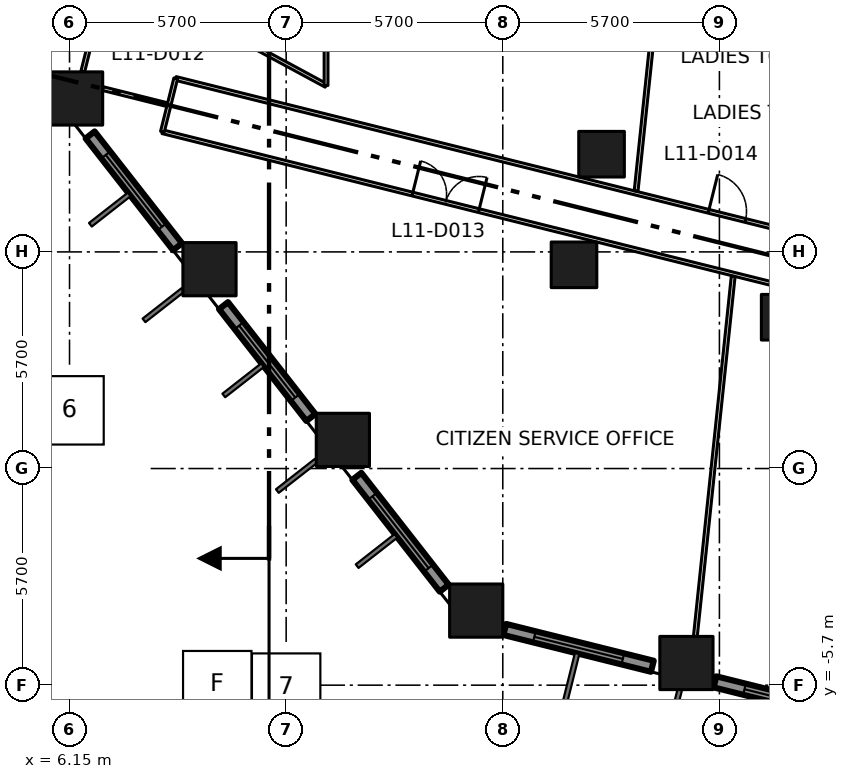
"""IFC4 building model, lengths in metres.
Left out: names, types, materials, properties, quantities, classifications, styles, units other than length and angle.
Written with IfcOpenShell. Run it as: python <this file> out.ifc"""

import sys

from ifc_helpers import new_model, si_unit, direction, frame, frame_2d, origin, origin_2d, place, context, subcontext, project, spatial, rectangle, extrude, element, fill, save


model = new_model("IFC4")
c1 = context("Model", 3, precision=1e-05, world=origin(), true_north=direction((0.0, 1.0)))
c2 = subcontext(c1, "Body", "Model", "MODEL_VIEW")
j1 = project(units=[si_unit("LENGTHUNIT", "METRE"), si_unit("PLANEANGLEUNIT", "RADIAN")], contexts=[c1])
p1 = place(None, origin())
s1 = spatial("IfcSite", under=j1, at=p1, CompositionType="ELEMENT")
p2 = place(p1, origin())
s2 = spatial("IfcBuilding", under=s1, at=p2, CompositionType="ELEMENT")
p3 = place(p2, frame((0.0, 0.0, 54.0)))
s3 = spatial("IfcBuildingStorey", under=s2, at=p3, CompositionType="ELEMENT", Elevation=54.0)
for number, where, z_axis, x_axis in (
    (1, (16.851, -3.738, 0.0), (0.0, 0.0, 1.0), (1.0, 0.0, 0.0)),
    (2, (13.342, 0.754, 0.0), (0.0, 0.0, 1.0), (1.0, 0.0, 0.0)),
    (3, (9.833, 5.245, 0.0), (0.0, 0.0, 1.0), (1.0, 0.0, 0.0)),
    (4, (6.323, 9.737, 0.0), (0.0, 0.0, 1.0), (1.0, 0.0, 0.0)),
    (5, (22.382, -5.117, 0.0), (0.0, 0.0, 1.0), (1.0, 0.0, 0.0)),
):
    element("IfcColumn", number, at=place(p3, frame(where, z_axis=z_axis, x_axis=x_axis)), inside=s3, PredefinedType="COLUMN", context=c2, shape_type="SweptSolid", body=[
        extrude(rectangle(XDim=1.4, YDim=1.4, at=origin_2d()), origin(), (0.0, 0.0, 1.0), 4.2),
    ])
for number, where, z_axis, x_axis in (
    (6, (19.424, 5.36, 0.0), (0.0, 0.0, 1.0), (1.0, 0.0, 0.0)),
    (7, (24.954, 3.981, 0.0), (0.0, 0.0, 1.0), (1.0, 0.0, 0.0)),
    (8, (20.149, 8.271, 0.0), (0.0, 0.0, 1.0), (1.0, 0.0, 0.0)),
):
    element("IfcColumn", number, at=place(p3, frame(where, z_axis=z_axis, x_axis=x_axis)), inside=s3, PredefinedType="COLUMN", context=c2, shape_type="SweptSolid", body=[
        extrude(rectangle(XDim=1.2, YDim=1.2, at=origin_2d()), origin(), (0.0, 0.0, 1.0), 4.2),
    ])
p4 = place(p3, frame((6.692, 8.778, 0.0), z_axis=(0.0, 0.0, 1.0), x_axis=(0.615767067156, -0.787928244833, 0.0)))
e9 = element("IfcWall", 9, at=p4, inside=s3, PredefinedType="SOLIDWALL", context=c2, shape_type="SweptSolid", body=[
    extrude(rectangle(XDim=3.735, YDim=0.3, at=frame_2d((1.868, 0.0))), origin(), (0.0, 0.0, 1.0), 3.1),
])
p5 = place(p4, frame((0.668, 0.0, 0.8)))
e10 = element("IfcOpeningElement", 10, at=p5, cuts=e9, PredefinedType="OPENING", context=c2, shape_type="SweptSolid", body=[
    extrude(rectangle(XDim=2.4, YDim=2.1, at=frame_2d((1.2, 1.05))), frame((0.0, 0.16, 0.0), z_axis=(0.0, -1.0, 0.0), x_axis=(1.0, 0.0, 0.0)), (0.0, 0.0, 1.0), 0.32),
])
p6 = place(p3, frame((10.202, 4.286, 0.0), z_axis=(0.0, 0.0, 1.0), x_axis=(0.615636430057, -0.788030320474, 0.0)))
e11 = element("IfcWall", 11, at=p6, inside=s3, PredefinedType="SOLIDWALL", context=c2, shape_type="SweptSolid", body=[
    extrude(rectangle(XDim=3.734, YDim=0.3, at=frame_2d((1.867, 0.0))), origin(), (0.0, 0.0, 1.0), 3.1),
])
p7 = place(p6, frame((0.667, 0.0, 0.8)))
e12 = element("IfcOpeningElement", 12, at=p7, cuts=e11, PredefinedType="OPENING", context=c2, shape_type="SweptSolid", body=[
    extrude(rectangle(XDim=2.4, YDim=2.1, at=frame_2d((1.2, 1.05))), frame((0.0, 0.16, 0.0), z_axis=(0.0, -1.0, 0.0), x_axis=(1.0, 0.0, 0.0)), (0.0, 0.0, 1.0), 0.32),
])
p8 = place(p3, frame((13.71, -0.205, 0.0), z_axis=(0.0, 0.0, 1.0), x_axis=(0.615798780214, -0.787903460004, 0.0)))
e13 = element("IfcWall", 13, at=p8, inside=s3, PredefinedType="SOLIDWALL", context=c2, shape_type="SweptSolid", body=[
    extrude(rectangle(XDim=3.735, YDim=0.3, at=frame_2d((1.868, 0.0))), origin(), (0.0, 0.0, 1.0), 3.1),
])
p9 = place(p8, frame((0.667, 0.0, 0.8)))
e14 = element("IfcOpeningElement", 14, at=p9, cuts=e13, PredefinedType="OPENING", context=c2, shape_type="SweptSolid", body=[
    extrude(rectangle(XDim=2.4, YDim=2.1, at=frame_2d((1.2, 1.05))), frame((0.0, 0.16, 0.0), z_axis=(0.0, -1.0, 0.0), x_axis=(1.0, 0.0, 0.0)), (0.0, 0.0, 1.0), 0.32),
])
p10 = place(p3, frame((17.602, -4.234, 0.0), z_axis=(0.0, 0.0, 1.0), x_axis=(0.970260773365, -0.242062040951, 0.0)))
e15 = element("IfcWall", 15, at=p10, inside=s3, PredefinedType="SOLIDWALL", context=c2, shape_type="SweptSolid", body=[
    extrude(rectangle(XDim=4.003, YDim=0.3, at=frame_2d((2.001, 0.0))), origin(), (0.0, 0.0, 1.0), 3.1),
])
p11 = place(p10, frame((0.802, 0.0, 0.8)))
e16 = element("IfcOpeningElement", 16, at=p11, cuts=e15, PredefinedType="OPENING", context=c2, shape_type="SweptSolid", body=[
    extrude(rectangle(XDim=2.4, YDim=2.1, at=frame_2d((1.2, 1.05))), frame((0.0, 0.16, 0.0), z_axis=(0.0, -1.0, 0.0), x_axis=(1.0, 0.0, 0.0)), (0.0, 0.0, 1.0), 0.32),
])
p12 = place(p3, frame((23.133, -5.613, 0.0), z_axis=(0.0, 0.0, 1.0), x_axis=(0.970303772127, -0.241889623168, 0.0)))
e17 = element("IfcWall", 17, at=p12, inside=s3, PredefinedType="SOLIDWALL", context=c2, shape_type="SweptSolid", body=[
    extrude(rectangle(XDim=4.002, YDim=0.3, at=frame_2d((2.001, 0.0))), origin(), (0.0, 0.0, 1.0), 3.1),
])
p13 = place(p12, frame((0.801, 0.0, 0.8)))
e18 = element("IfcOpeningElement", 18, at=p13, cuts=e17, PredefinedType="OPENING", context=c2, shape_type="SweptSolid", body=[
    extrude(rectangle(XDim=2.4, YDim=2.1, at=frame_2d((1.2, 1.05))), frame((0.0, 0.16, 0.0), z_axis=(0.0, -1.0, 0.0), x_axis=(1.0, 0.0, 0.0)), (0.0, 0.0, 1.0), 0.32),
])
p14 = place(p3, frame((8.594, 8.862, 0.0), z_axis=(0.0, 0.0, 1.0), x_axis=(0.970292243361, -0.241935864379, 0.0)))
e19 = element("IfcWall", 19, at=p14, inside=s3, PredefinedType="PARTITIONING", context=c2, shape_type="SweptSolid", body=[
    extrude(rectangle(XDim=68.775, YDim=0.1, at=frame_2d((34.388, 0.0))), origin(), (0.0, 0.0, 1.0), 3.9),
])
p15 = place(p14, frame((36.265, 0.0, 0.0)))
e20 = element("IfcOpeningElement", 20, at=p15, cuts=e19, PredefinedType="OPENING", context=c2, shape_type="SweptSolid", body=[
    extrude(rectangle(XDim=1.8, YDim=2.1, at=frame_2d((0.9, 1.05))), frame((0.0, 0.06, 0.0), z_axis=(0.0, -1.0, 0.0), x_axis=(1.0, 0.0, 0.0)), (0.0, 0.0, 1.0), 0.12),
])
p16 = place(p14, frame((48.365, 0.0, 0.0)))
e21 = element("IfcOpeningElement", 21, at=p16, cuts=e19, PredefinedType="OPENING", context=c2, shape_type="SweptSolid", body=[
    extrude(rectangle(XDim=1.8, YDim=2.1, at=frame_2d((0.9, 1.05))), frame((0.0, 0.06, 0.0), z_axis=(0.0, -1.0, 0.0), x_axis=(1.0, 0.0, 0.0)), (0.0, 0.0, 1.0), 0.12),
])
p17 = place(p14, frame((19.565, 0.0, 0.0)))
e22 = element("IfcOpeningElement", 22, at=p17, cuts=e19, PredefinedType="OPENING", context=c2, shape_type="SweptSolid", body=[
    extrude(rectangle(XDim=1.0, YDim=2.1, at=frame_2d((0.5, 1.05))), frame((0.0, 0.06, 0.0), z_axis=(0.0, -1.0, 0.0), x_axis=(1.0, 0.0, 0.0)), (0.0, 0.0, 1.0), 0.12),
])
p18 = place(p14, frame((24.165, 0.0, 0.0)))
e23 = element("IfcOpeningElement", 23, at=p18, cuts=e19, PredefinedType="OPENING", context=c2, shape_type="SweptSolid", body=[
    extrude(rectangle(XDim=1.8, YDim=2.1, at=frame_2d((0.9, 1.05))), frame((0.0, 0.06, 0.0), z_axis=(0.0, -1.0, 0.0), x_axis=(1.0, 0.0, 0.0)), (0.0, 0.0, 1.0), 0.12),
])
p19 = place(p14, frame((6.78, 0.0, 0.0)))
e24 = element("IfcOpeningElement", 24, at=p19, cuts=e19, PredefinedType="OPENING", context=c2, shape_type="SweptSolid", body=[
    extrude(rectangle(XDim=1.8, YDim=2.1, at=frame_2d((0.9, 1.05))), frame((0.0, 0.06, 0.0), z_axis=(0.0, -1.0, 0.0), x_axis=(1.0, 0.0, 0.0)), (0.0, 0.0, 1.0), 0.12),
])
p20 = place(p3, frame((8.944, 10.264, 0.0), z_axis=(0.0, 0.0, 1.0), x_axis=(0.970300504447, -0.241902730595, 0.0)))
e25 = element("IfcWall", 25, at=p20, inside=s3, PredefinedType="PARTITIONING", context=c2, shape_type="SweptSolid", body=[
    extrude(rectangle(XDim=19.879, YDim=0.1, at=frame_2d((9.939, 0.0))), origin(), (0.0, 0.0, 1.0), 3.9),
])
p21 = place(p20, frame((14.45, 0.0, 0.0)))
e26 = element("IfcOpeningElement", 26, at=p21, cuts=e25, PredefinedType="OPENING", context=c2, shape_type="SweptSolid", body=[
    extrude(rectangle(XDim=1.0, YDim=2.1, at=frame_2d((0.5, 1.05))), frame((0.0, 0.06, 0.0), z_axis=(0.0, -1.0, 0.0), x_axis=(1.0, 0.0, 0.0)), (0.0, 0.0, 1.0), 0.12),
])
p22 = place(p3, frame((8.944, 10.264, 0.0), z_axis=(0.0, 0.0, 1.0), x_axis=(-0.242297077633, -0.970202105837, 0.0)))
e27 = element("IfcWall", 27, at=p22, inside=s3, PredefinedType="PARTITIONING", context=c2, shape_type="SweptSolid", body=[
    extrude(rectangle(XDim=1.445, YDim=0.1, at=frame_2d((0.722, 0.0))), origin(), (0.0, 0.0, 1.0), 3.9),
])
p23 = place(p3, frame((9.9, 11.7, 0.0), z_axis=(0.0, 0.0, 1.0), x_axis=(0.87965147249, -0.475618846291, 0.0)))
e28 = element("IfcWall", 28, at=p23, inside=s3, PredefinedType="PARTITIONING", context=c2, shape_type="SweptSolid", body=[
    extrude(rectangle(XDim=3.41, YDim=0.1, at=frame_2d((1.705, 0.0))), origin(), (0.0, 0.0, 1.0), 3.9),
])
p24 = place(p3, frame((12.9, 10.078, 0.0), z_axis=(0.0, 0.0, 1.0), x_axis=(0.0, 1.0, 0.0)))
e29 = element("IfcWall", 29, at=p24, inside=s3, PredefinedType="PARTITIONING", context=c2, shape_type="SweptSolid", body=[
    extrude(rectangle(XDim=4.022, YDim=0.1, at=frame_2d((2.011, 0.0))), origin(), (0.0, 0.0, 1.0), 3.9),
])
p25 = place(p3, frame((6.797, 11.638, 0.0), z_axis=(0.0, 0.0, 1.0), x_axis=(-0.242396400943, -0.970177295555, 0.0)))
e30 = element("IfcWall", 30, at=p25, inside=s3, PredefinedType="PARTITIONING", context=c2, shape_type="SweptSolid", body=[
    extrude(rectangle(XDim=1.238, YDim=0.1, at=frame_2d((0.619, 0.0))), origin(), (0.0, 0.0, 1.0), 3.9),
])
p26 = place(p3, frame((8.72, 9.574, 0.0), z_axis=(0.0, 0.0, 1.0), x_axis=(-0.97016712555, 0.242437102155, 0.0)))
e31 = element("IfcWall", 31, at=p26, inside=s3, PredefinedType="PARTITIONING", context=c2, shape_type="SweptSolid", body=[
    extrude(rectangle(XDim=1.749, YDim=0.1, at=frame_2d((0.875, 0.0))), origin(), (0.0, 0.0, 1.0), 3.9),
])
p27 = place(p3, frame((21.058, 7.302, 0.0), z_axis=(0.0, 0.0, 1.0), x_axis=(0.10457695042, 0.994516797968, 0.0)))
e32 = element("IfcWall", 32, at=p27, inside=s3, PredefinedType="PARTITIONING", context=c2, shape_type="SweptSolid", body=[
    extrude(rectangle(XDim=6.836, YDim=0.1, at=frame_2d((3.418, 0.0))), origin(), (0.0, 0.0, 1.0), 3.9),
])
p28 = place(p3, frame((22.617, -4.417, 0.0), z_axis=(0.0, 0.0, 1.0), x_axis=(0.10455139139, 0.994519485258, 0.0)))
e33 = element("IfcWall", 33, at=p28, inside=s3, PredefinedType="PARTITIONING", context=c2, shape_type="SweptSolid", body=[
    extrude(rectangle(XDim=9.527, YDim=0.1, at=frame_2d((4.764, 0.0))), origin(), (0.0, 0.0, 1.0), 3.9),
])
p29 = place(p5, origin())
e34 = element("IfcWindow", 34, at=p29, inside=s3, PartitioningType="DOUBLE_PANEL_VERTICAL", PredefinedType="WINDOW", context=c2, shape_type="SweptSolid", body=[
    extrude(rectangle(XDim=2.4, YDim=2.1, at=frame_2d((1.2, 1.05))), frame((0.0, 0.03, 0.0), z_axis=(0.0, -1.0, 0.0), x_axis=(1.0, 0.0, 0.0)), (0.0, 0.0, 1.0), 0.06),
])
fill(e10, e34)
p30 = place(p7, origin())
e35 = element("IfcWindow", 35, at=p30, inside=s3, PartitioningType="DOUBLE_PANEL_VERTICAL", PredefinedType="WINDOW", context=c2, shape_type="SweptSolid", body=[
    extrude(rectangle(XDim=2.4, YDim=2.1, at=frame_2d((1.2, 1.05))), frame((0.0, 0.03, 0.0), z_axis=(0.0, -1.0, 0.0), x_axis=(1.0, 0.0, 0.0)), (0.0, 0.0, 1.0), 0.06),
])
fill(e12, e35)
p31 = place(p9, origin())
e36 = element("IfcWindow", 36, at=p31, inside=s3, PartitioningType="DOUBLE_PANEL_VERTICAL", PredefinedType="WINDOW", context=c2, shape_type="SweptSolid", body=[
    extrude(rectangle(XDim=2.4, YDim=2.1, at=frame_2d((1.2, 1.05))), frame((0.0, 0.03, 0.0), z_axis=(0.0, -1.0, 0.0), x_axis=(1.0, 0.0, 0.0)), (0.0, 0.0, 1.0), 0.06),
])
fill(e14, e36)
p32 = place(p11, origin())
e37 = element("IfcWindow", 37, at=p32, inside=s3, PartitioningType="DOUBLE_PANEL_VERTICAL", PredefinedType="WINDOW", context=c2, shape_type="SweptSolid", body=[
    extrude(rectangle(XDim=2.4, YDim=2.1, at=frame_2d((1.2, 1.05))), frame((0.0, 0.03, 0.0), z_axis=(0.0, -1.0, 0.0), x_axis=(1.0, 0.0, 0.0)), (0.0, 0.0, 1.0), 0.06),
])
fill(e16, e37)
p33 = place(p13, origin())
e38 = element("IfcWindow", 38, at=p33, inside=s3, PartitioningType="DOUBLE_PANEL_VERTICAL", PredefinedType="WINDOW", context=c2, shape_type="SweptSolid", body=[
    extrude(rectangle(XDim=2.4, YDim=2.1, at=frame_2d((1.2, 1.05))), frame((0.0, 0.03, 0.0), z_axis=(0.0, -1.0, 0.0), x_axis=(1.0, 0.0, 0.0)), (0.0, 0.0, 1.0), 0.06),
])
fill(e18, e38)
p34 = place(p19, origin())
e39 = element("IfcDoor", 39, at=p34, inside=s3, OperationType="DOUBLE_DOOR_SINGLE_SWING", PredefinedType="DOOR", context=c2, shape_type="SweptSolid", body=[
    extrude(rectangle(XDim=1.8, YDim=2.1, at=frame_2d((0.9, 1.05))), frame((0.0, 0.025, 0.0), z_axis=(0.0, -1.0, 0.0), x_axis=(1.0, 0.0, 0.0)), (0.0, 0.0, 1.0), 0.05),
])
fill(e24, e39)
p35 = place(p21, origin())
e40 = element("IfcDoor", 40, at=p35, inside=s3, OperationType="SINGLE_SWING_LEFT", PredefinedType="DOOR", context=c2, shape_type="SweptSolid", body=[
    extrude(rectangle(XDim=1.0, YDim=2.1, at=frame_2d((0.5, 1.05))), frame((0.0, 0.025, 0.0), z_axis=(0.0, -1.0, 0.0), x_axis=(1.0, 0.0, 0.0)), (0.0, 0.0, 1.0), 0.05),
])
fill(e26, e40)
save(model, sys.argv[1])
